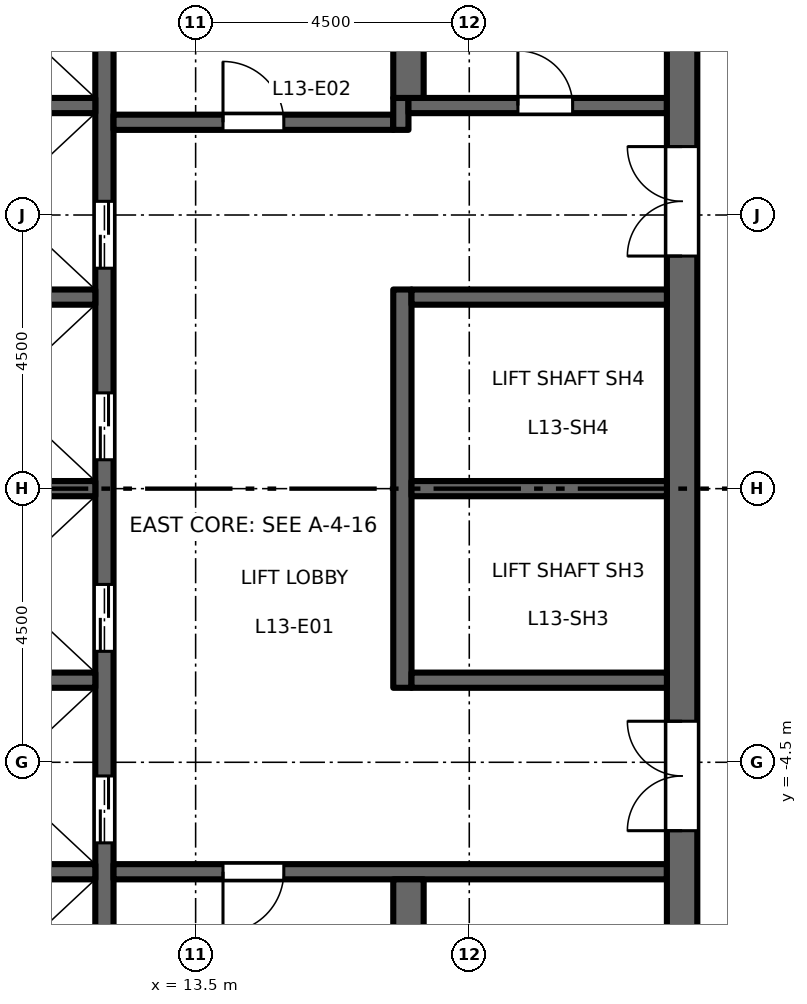
"""IFC4 building model, lengths in metres.
Left out: names, types, materials, properties, quantities, classifications, styles, units other than length and angle.
Written with IfcOpenShell. Run it as: python <this file> out.ifc"""

import sys

from ifc_helpers import new_model, si_unit, direction, frame, frame_2d, origin, place, context, subcontext, project, spatial, rectangle, extrude, element, fill, save


model = new_model("IFC4")
c1 = context("Model", 3, precision=1e-05, world=origin(), true_north=direction((0.0, 1.0)))
c2 = subcontext(c1, "Body", "Model", "MODEL_VIEW")
j1 = project(units=[si_unit("LENGTHUNIT", "METRE"), si_unit("PLANEANGLEUNIT", "RADIAN")], contexts=[c1])
p1 = place(None, origin())
s1 = spatial("IfcSite", under=j1, at=p1, CompositionType="ELEMENT")
p2 = place(p1, origin())
s2 = spatial("IfcBuilding", under=s1, at=p2, CompositionType="ELEMENT")
p3 = place(p2, frame((0.0, 0.0, 62.7)))
s3 = spatial("IfcBuildingStorey", under=s2, at=p3, CompositionType="ELEMENT", Elevation=62.7)
p4 = place(p3, frame((12.0, -9.45, 0.0), z_axis=(0.0, 0.0, 1.0), x_axis=(0.0, 1.0, 0.0)))
e1 = element("IfcWall", 1, at=p4, inside=s3, PredefinedType="SHEAR", context=c2, shape_type="SweptSolid", body=[
    extrude(rectangle(XDim=18.9, YDim=0.3, at=frame_2d((9.45, 0.0))), origin(), (0.0, 0.0, 1.0), 4.35),
])
p5 = place(p4, frame((3.625, 0.0, 0.0)))
e2 = element("IfcOpeningElement", 2, at=p5, cuts=e1, PredefinedType="OPENING", context=c2, shape_type="SweptSolid", body=[
    extrude(rectangle(XDim=1.1, YDim=2.1, at=frame_2d((0.55, 1.05))), frame((0.0, 0.16, 0.0), z_axis=(0.0, -1.0, 0.0), x_axis=(1.0, 0.0, 0.0)), (0.0, 0.0, 1.0), 0.32),
])
p6 = place(p4, frame((6.775, 0.0, 0.0)))
e3 = element("IfcOpeningElement", 3, at=p6, cuts=e1, PredefinedType="OPENING", context=c2, shape_type="SweptSolid", body=[
    extrude(rectangle(XDim=1.1, YDim=2.1, at=frame_2d((0.55, 1.05))), frame((0.0, 0.16, 0.0), z_axis=(0.0, -1.0, 0.0), x_axis=(1.0, 0.0, 0.0)), (0.0, 0.0, 1.0), 0.32),
])
p7 = place(p4, frame((9.925, 0.0, 0.0)))
e4 = element("IfcOpeningElement", 4, at=p7, cuts=e1, PredefinedType="OPENING", context=c2, shape_type="SweptSolid", body=[
    extrude(rectangle(XDim=1.1, YDim=2.1, at=frame_2d((0.55, 1.05))), frame((0.0, 0.16, 0.0), z_axis=(0.0, -1.0, 0.0), x_axis=(1.0, 0.0, 0.0)), (0.0, 0.0, 1.0), 0.32),
])
p8 = place(p4, frame((13.075, 0.0, 0.0)))
e5 = element("IfcOpeningElement", 5, at=p8, cuts=e1, PredefinedType="OPENING", context=c2, shape_type="SweptSolid", body=[
    extrude(rectangle(XDim=1.1, YDim=2.1, at=frame_2d((0.55, 1.05))), frame((0.0, 0.16, 0.0), z_axis=(0.0, -1.0, 0.0), x_axis=(1.0, 0.0, 0.0)), (0.0, 0.0, 1.0), 0.32),
])
p9 = place(p4, frame((16.725, 0.0, 0.0)))
e6 = element("IfcOpeningElement", 6, at=p9, cuts=e1, PredefinedType="OPENING", context=c2, shape_type="SweptSolid", body=[
    extrude(rectangle(XDim=1.2, YDim=2.1, at=frame_2d((0.6, 1.05))), frame((0.0, 0.16, 0.0), z_axis=(0.0, -1.0, 0.0), x_axis=(1.0, 0.0, 0.0)), (0.0, 0.0, 1.0), 0.32),
])
p10 = place(p4, frame((0.975, 0.0, 0.0)))
e7 = element("IfcOpeningElement", 7, at=p10, cuts=e1, PredefinedType="OPENING", context=c2, shape_type="SweptSolid", body=[
    extrude(rectangle(XDim=1.2, YDim=2.1, at=frame_2d((0.6, 1.05))), frame((0.0, 0.16, 0.0), z_axis=(0.0, -1.0, 0.0), x_axis=(1.0, 0.0, 0.0)), (0.0, 0.0, 1.0), 0.32),
])
p11 = place(p3, frame((12.15, 6.025, 0.0), z_axis=(0.0, 0.0, 1.0), x_axis=(1.0, 0.0, 0.0)))
e8 = element("IfcWall", 8, at=p11, inside=s3, PredefinedType="SHEAR", context=c2, shape_type="SweptSolid", body=[
    extrude(rectangle(XDim=4.6, YDim=0.25, at=frame_2d((2.3, 0.0))), origin(), (0.0, 0.0, 1.0), 4.35),
])
p12 = place(p11, frame((1.8, 0.0, 0.0)))
e9 = element("IfcOpeningElement", 9, at=p12, cuts=e8, PredefinedType="OPENING", context=c2, shape_type="SweptSolid", body=[
    extrude(rectangle(XDim=1.0, YDim=2.1, at=frame_2d((0.5, 1.05))), frame((0.0, 0.135, 0.0), z_axis=(0.0, -1.0, 0.0), x_axis=(1.0, 0.0, 0.0)), (0.0, 0.0, 1.0), 0.27),
])
p13 = place(p3, frame((16.875, 5.9, 0.0), z_axis=(0.0, 0.0, 1.0), x_axis=(0.0, 1.0, 0.0)))
e10 = element("IfcWall", 10, at=p13, inside=s3, PredefinedType="SHEAR", context=c2, shape_type="SweptSolid", body=[
    extrude(rectangle(XDim=0.525, YDim=0.25, at=frame_2d((0.263, 0.0))), origin(), (0.0, 0.0, 1.0), 4.35),
])
p14 = place(p3, frame((17.0, 6.3, 0.0), z_axis=(0.0, 0.0, 1.0), x_axis=(1.0, 0.0, 0.0)))
e11 = element("IfcWall", 11, at=p14, inside=s3, PredefinedType="SHEAR", context=c2, shape_type="SweptSolid", body=[
    extrude(rectangle(XDim=4.25, YDim=0.25, at=frame_2d((2.125, 0.0))), origin(), (0.0, 0.0, 1.0), 4.35),
])
p15 = place(p14, frame((1.8, 0.0, 0.0)))
e12 = element("IfcOpeningElement", 12, at=p15, cuts=e11, PredefinedType="OPENING", context=c2, shape_type="SweptSolid", body=[
    extrude(rectangle(XDim=0.9, YDim=2.1, at=frame_2d((0.45, 1.05))), frame((0.0, 0.135, 0.0), z_axis=(0.0, -1.0, 0.0), x_axis=(1.0, 0.0, 0.0)), (0.0, 0.0, 1.0), 0.27),
])
p16 = place(p3, frame((12.15, -6.3, 0.0), z_axis=(0.0, 0.0, 1.0), x_axis=(1.0, 0.0, 0.0)))
e13 = element("IfcWall", 13, at=p16, inside=s3, PredefinedType="SHEAR", context=c2, shape_type="SweptSolid", body=[
    extrude(rectangle(XDim=9.1, YDim=0.25, at=frame_2d((4.55, 0.0))), origin(), (0.0, 0.0, 1.0), 4.35),
])
p17 = place(p16, frame((1.8, 0.0, 0.0)))
e14 = element("IfcOpeningElement", 14, at=p17, cuts=e13, PredefinedType="OPENING", context=c2, shape_type="SweptSolid", body=[
    extrude(rectangle(XDim=1.0, YDim=2.1, at=frame_2d((0.5, 1.05))), frame((0.0, 0.135, 0.0), z_axis=(0.0, -1.0, 0.0), x_axis=(1.0, 0.0, 0.0)), (0.0, 0.0, 1.0), 0.27),
])
p18 = place(p3, frame((21.5, -13.0, 0.0), z_axis=(0.0, 0.0, 1.0), x_axis=(0.0, 1.0, 0.0)))
e15 = element("IfcWall", 15, at=p18, inside=s3, PredefinedType="SHEAR", context=c2, shape_type="SweptSolid", body=[
    extrude(rectangle(XDim=26.0, YDim=0.5, at=frame_2d((13.0, 0.0))), origin(), (0.0, 0.0, 1.0), 4.35),
])
p19 = place(p18, frame((16.825, 0.0, 0.0)))
e16 = element("IfcOpeningElement", 16, at=p19, cuts=e15, PredefinedType="OPENING", context=c2, shape_type="SweptSolid", body=[
    extrude(rectangle(XDim=1.8, YDim=2.1, at=frame_2d((0.9, 1.05))), frame((0.0, 0.26, 0.0), z_axis=(0.0, -1.0, 0.0), x_axis=(1.0, 0.0, 0.0)), (0.0, 0.0, 1.0), 0.52),
])
p20 = place(p18, frame((7.375, 0.0, 0.0)))
e17 = element("IfcOpeningElement", 17, at=p20, cuts=e15, PredefinedType="OPENING", context=c2, shape_type="SweptSolid", body=[
    extrude(rectangle(XDim=1.8, YDim=2.1, at=frame_2d((0.9, 1.05))), frame((0.0, 0.26, 0.0), z_axis=(0.0, -1.0, 0.0), x_axis=(1.0, 0.0, 0.0)), (0.0, 0.0, 1.0), 0.52),
])
p21 = place(p18, frame((2.65, 0.0, 0.0)))
e18 = element("IfcOpeningElement", 18, at=p21, cuts=e15, PredefinedType="OPENING", context=c2, shape_type="SweptSolid", body=[
    extrude(rectangle(XDim=0.9, YDim=2.1, at=frame_2d((0.45, 1.05))), frame((0.0, 0.26, 0.0), z_axis=(0.0, -1.0, 0.0), x_axis=(1.0, 0.0, 0.0)), (0.0, 0.0, 1.0), 0.52),
])
p22 = place(p3, frame((16.9, -3.275, 0.0), z_axis=(0.0, 0.0, 1.0), x_axis=(0.0, 1.0, 0.0)))
e19 = element("IfcWall", 19, at=p22, inside=s3, PredefinedType="SHEAR", context=c2, shape_type="SweptSolid", body=[
    extrude(rectangle(XDim=6.55, YDim=0.3, at=frame_2d((3.275, 0.0))), origin(), (0.0, 0.0, 1.0), 4.35),
])
for number, where, z_axis, x_axis in (
    (20, (17.05, 0.0, 0.0), (0.0, 0.0, 1.0), (1.0, 0.0, 0.0)),
    (21, (17.05, 3.15, 0.0), (0.0, 0.0, 1.0), (1.0, 0.0, 0.0)),
    (22, (17.05, -3.15, 0.0), (0.0, 0.0, 1.0), (1.0, 0.0, 0.0)),
):
    element("IfcWall", number, at=place(p3, frame(where, z_axis=z_axis, x_axis=x_axis)), inside=s3, PredefinedType="SHEAR", context=c2, shape_type="SweptSolid", body=[
        extrude(rectangle(XDim=4.2, YDim=0.25, at=frame_2d((2.1, 0.0))), origin(), (0.0, 0.0, 1.0), 4.35),
    ])
for number, where, z_axis, x_axis in (
    (23, (17.0, 6.425, 0.0), (0.0, 0.0, 1.0), (0.0, 1.0, 0.0)),
    (24, (17.0, -13.0, 0.0), (0.0, 0.0, 1.0), (0.0, 1.0, 0.0)),
):
    element("IfcWall", number, at=place(p3, frame(where, z_axis=z_axis, x_axis=x_axis)), inside=s3, PredefinedType="SHEAR", context=c2, shape_type="SweptSolid", body=[
        extrude(rectangle(XDim=6.575, YDim=0.5, at=frame_2d((3.288, 0.0))), origin(), (0.0, 0.0, 1.0), 4.35),
    ])
for number, where, z_axis, x_axis in (
    (25, (8.75, 0.0, 0.0), (0.0, 0.0, 1.0), (1.0, 0.0, 0.0)),
    (26, (8.75, 3.15, 0.0), (0.0, 0.0, 1.0), (1.0, 0.0, 0.0)),
    (27, (8.75, 6.3, 0.0), (0.0, 0.0, 1.0), (1.0, 0.0, 0.0)),
    (28, (8.75, -3.15, 0.0), (0.0, 0.0, 1.0), (1.0, 0.0, 0.0)),
    (29, (8.75, -6.3, 0.0), (0.0, 0.0, 1.0), (1.0, 0.0, 0.0)),
):
    element("IfcWall", number, at=place(p3, frame(where, z_axis=z_axis, x_axis=x_axis)), inside=s3, PredefinedType="SHEAR", context=c2, shape_type="SweptSolid", body=[
        extrude(rectangle(XDim=3.1, YDim=0.25, at=frame_2d((1.55, 0.0))), origin(), (0.0, 0.0, 1.0), 4.35),
    ])
p23 = place(p12, origin())
e30 = element("IfcDoor", 30, at=p23, inside=s3, OperationType="SINGLE_SWING_RIGHT", PredefinedType="DOOR", context=c2, shape_type="SweptSolid", body=[
    extrude(rectangle(XDim=1.0, YDim=2.1, at=frame_2d((0.5, 1.05))), frame((0.0, 0.025, 0.0), z_axis=(0.0, -1.0, 0.0), x_axis=(1.0, 0.0, 0.0)), (0.0, 0.0, 1.0), 0.05),
])
fill(e9, e30)
p24 = place(p17, origin())
e31 = element("IfcDoor", 31, at=p24, inside=s3, OperationType="SINGLE_SWING_LEFT", PredefinedType="DOOR", context=c2, shape_type="SweptSolid", body=[
    extrude(rectangle(XDim=1.0, YDim=2.1, at=frame_2d((0.5, 1.05))), frame((0.0, 0.025, 0.0), z_axis=(0.0, -1.0, 0.0), x_axis=(1.0, 0.0, 0.0)), (0.0, 0.0, 1.0), 0.05),
])
fill(e14, e31)
p25 = place(p19, origin())
e32 = element("IfcDoor", 32, at=p25, inside=s3, OperationType="DOUBLE_DOOR_DOUBLE_SWING", PredefinedType="DOOR", context=c2, shape_type="SweptSolid", body=[
    extrude(rectangle(XDim=1.8, YDim=2.1, at=frame_2d((0.9, 1.05))), frame((0.0, 0.025, 0.0), z_axis=(0.0, -1.0, 0.0), x_axis=(1.0, 0.0, 0.0)), (0.0, 0.0, 1.0), 0.05),
])
fill(e16, e32)
p26 = place(p20, origin())
e33 = element("IfcDoor", 33, at=p26, inside=s3, OperationType="DOUBLE_DOOR_DOUBLE_SWING", PredefinedType="DOOR", context=c2, shape_type="SweptSolid", body=[
    extrude(rectangle(XDim=1.8, YDim=2.1, at=frame_2d((0.9, 1.05))), frame((0.0, 0.025, 0.0), z_axis=(0.0, -1.0, 0.0), x_axis=(1.0, 0.0, 0.0)), (0.0, 0.0, 1.0), 0.05),
])
fill(e17, e33)
p27 = place(p5, origin())
e34 = element("IfcDoor", 34, at=p27, inside=s3, OperationType="DOUBLE_DOOR_SLIDING", PredefinedType="DOOR", context=c2, shape_type="SweptSolid", body=[
    extrude(rectangle(XDim=1.1, YDim=2.1, at=frame_2d((0.55, 1.05))), frame((0.0, 0.025, 0.0), z_axis=(0.0, -1.0, 0.0), x_axis=(1.0, 0.0, 0.0)), (0.0, 0.0, 1.0), 0.05),
])
fill(e2, e34)
p28 = place(p6, origin())
e35 = element("IfcDoor", 35, at=p28, inside=s3, OperationType="DOUBLE_DOOR_SLIDING", PredefinedType="DOOR", context=c2, shape_type="SweptSolid", body=[
    extrude(rectangle(XDim=1.1, YDim=2.1, at=frame_2d((0.55, 1.05))), frame((0.0, 0.025, 0.0), z_axis=(0.0, -1.0, 0.0), x_axis=(1.0, 0.0, 0.0)), (0.0, 0.0, 1.0), 0.05),
])
fill(e3, e35)
p29 = place(p7, origin())
e36 = element("IfcDoor", 36, at=p29, inside=s3, OperationType="DOUBLE_DOOR_SLIDING", PredefinedType="DOOR", context=c2, shape_type="SweptSolid", body=[
    extrude(rectangle(XDim=1.1, YDim=2.1, at=frame_2d((0.55, 1.05))), frame((0.0, 0.025, 0.0), z_axis=(0.0, -1.0, 0.0), x_axis=(1.0, 0.0, 0.0)), (0.0, 0.0, 1.0), 0.05),
])
fill(e4, e36)
p30 = place(p8, origin())
e37 = element("IfcDoor", 37, at=p30, inside=s3, OperationType="DOUBLE_DOOR_SLIDING", PredefinedType="DOOR", context=c2, shape_type="SweptSolid", body=[
    extrude(rectangle(XDim=1.1, YDim=2.1, at=frame_2d((0.55, 1.05))), frame((0.0, 0.025, 0.0), z_axis=(0.0, -1.0, 0.0), x_axis=(1.0, 0.0, 0.0)), (0.0, 0.0, 1.0), 0.05),
])
fill(e5, e37)
p31 = place(p15, origin())
e38 = element("IfcDoor", 38, at=p31, inside=s3, OperationType="SINGLE_SWING_RIGHT", PredefinedType="DOOR", context=c2, shape_type="SweptSolid", body=[
    extrude(rectangle(XDim=0.9, YDim=2.1, at=frame_2d((0.45, 1.05))), frame((0.0, 0.025, 0.0), z_axis=(0.0, -1.0, 0.0), x_axis=(1.0, 0.0, 0.0)), (0.0, 0.0, 1.0), 0.05),
])
fill(e12, e38)
save(model, sys.argv[1])
